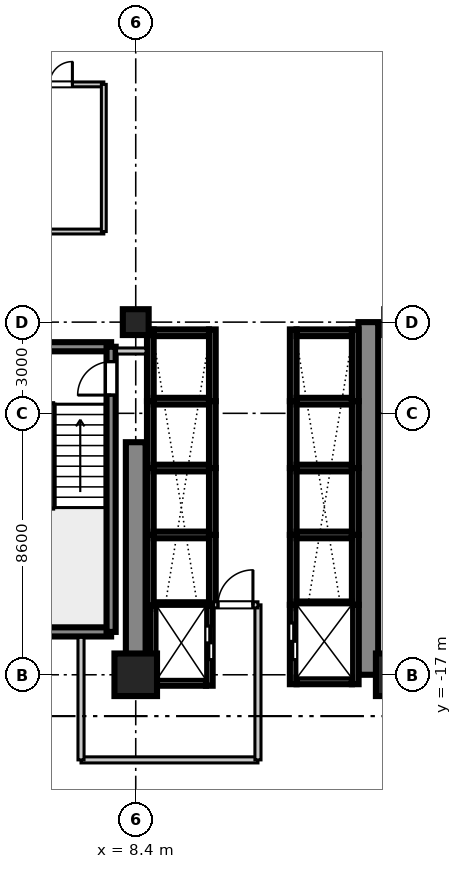
"""IFC4 building model, lengths in metres.
Left out: names, types, materials, properties, quantities, classifications, styles, units other than length and angle.
Written with IfcOpenShell. Run it as: python <this file> out.ifc"""

import sys

from ifc_helpers import new_model, si_unit, direction, frame, frame_2d, origin, origin_2d, place, context, subcontext, project, spatial, rectangle, extrude, source, transform, mapped, element, fill, save


model = new_model("IFC4")
c1 = context("Model", 3, precision=1e-05, world=origin(), true_north=direction((0.0, 1.0)))
c2 = subcontext(c1, "Body", "Model", "MODEL_VIEW")
j1 = project(units=[si_unit("LENGTHUNIT", "METRE"), si_unit("PLANEANGLEUNIT", "RADIAN")], contexts=[c1])
p1 = place(None, origin())
s1 = spatial("IfcSite", under=j1, at=p1, CompositionType="ELEMENT")
p2 = place(p1, origin())
s2 = spatial("IfcBuilding", under=s1, at=p2, CompositionType="ELEMENT")
p3 = place(p2, frame((0.0, 0.0, 76.2)))
s3 = spatial("IfcBuildingStorey", under=s2, at=p3, CompositionType="ELEMENT", Elevation=76.2)
m1 = source(origin(), c2, "Body", "SweptSolid", [
    extrude(rectangle(XDim=1.4, YDim=1.4, at=origin_2d()), origin(), (0.0, 0.0, 1.0), 3.605),
])
p4 = place(p3, frame((8.4, -17.0, 0.0), z_axis=(0.0, 0.0, 1.0), x_axis=(1.0, 0.0, 0.0)))
e1 = element("IfcColumn", 1, at=p4, inside=s3, PredefinedType="COLUMN", context=c2, shape_type="MappedRepresentation", body=[
    mapped(m1, transform((0.0, 0.0, 0.0), scale=1.0)),
])
m2 = source(origin(), c2, "Body", "SweptSolid", [
    extrude(rectangle(XDim=0.85, YDim=0.85, at=origin_2d()), origin(), (0.0, 0.0, 1.0), 3.605),
])
p5 = place(p3, frame((8.4, -5.4, 0.0), z_axis=(0.0, 0.0, 1.0), x_axis=(1.0, 0.0, 0.0)))
e2 = element("IfcColumn", 2, at=p5, inside=s3, PredefinedType="PILASTER", context=c2, shape_type="MappedRepresentation", body=[
    mapped(m2, transform((0.0, 0.0, 0.0), scale=1.0)),
])
p6 = place(p3, frame((17.0, -17.0, 0.0), z_axis=(0.0, 0.0, 1.0), x_axis=(1.0, 0.0, 0.0)))
e3 = element("IfcColumn", 3, at=p6, inside=s3, PredefinedType="COLUMN", context=c2, shape_type="MappedRepresentation", body=[
    mapped(m1, transform((0.0, 0.0, 0.0), scale=1.0)),
])
m3 = source(origin(), c2, "Body", "SweptSolid", [
    extrude(rectangle(XDim=7.65, YDim=0.65, at=frame_2d((3.825, 0.0))), origin(), (0.0, 0.0, 1.0), 3.37),
])
p7 = place(p3, frame((8.4, -17.0, 0.0), z_axis=(0.0, 0.0, 1.0), x_axis=(0.0, 1.0, 0.0)))
e4 = element("IfcWall", 4, at=p7, inside=s3, PredefinedType="SHEAR", context=c2, shape_type="MappedRepresentation", body=[
    mapped(m3, transform((0.0, 0.0, 0.0), scale=1.0)),
])
m4 = source(origin(), c2, "Body", "SweptSolid", [
    extrude(rectangle(XDim=11.6, YDim=0.65, at=frame_2d((5.8, 0.0))), origin(), (0.0, 0.0, 1.0), 3.37),
])
p8 = place(p3, frame((16.05, -17.0, 0.0), z_axis=(0.0, 0.0, 1.0), x_axis=(0.0, 1.0, 0.0)))
e5 = element("IfcWall", 5, at=p8, inside=s3, PredefinedType="SHEAR", context=c2, shape_type="MappedRepresentation", body=[
    mapped(m4, transform((0.0, 0.0, 0.0), scale=1.0)),
])
m5 = source(origin(), c2, "Body", "SweptSolid", [
    extrude(rectangle(XDim=3.98, YDim=0.3, at=frame_2d((1.99, 0.0))), origin(), (0.0, 0.0, 1.0), 3.37),
])
for number, where, z_axis, x_axis in (
    (6, (3.61, -15.59, 0.0), (0.0, 0.0, 1.0), (1.0, 0.0, 0.0)),
    (7, (3.61, -6.21, 0.0), (0.0, 0.0, 1.0), (1.0, 0.0, 0.0)),
):
    element("IfcWall", number, at=place(p3, frame(where, z_axis=z_axis, x_axis=x_axis)), inside=s3, PredefinedType="SHEAR", context=c2, shape_type="MappedRepresentation", body=[
        mapped(m5, transform((0.0, 0.0, 0.0), scale=1.0)),
    ])
m6 = source(origin(), c2, "Body", "SweptSolid", [
    extrude(rectangle(XDim=9.38, YDim=0.3, at=frame_2d((4.69, 0.0))), origin(), (0.0, 0.0, 1.0), 3.37),
])
p9 = place(p3, frame((7.59, -15.59, 0.0), z_axis=(0.0, 0.0, 1.0), x_axis=(0.0, 1.0, 0.0)))
e8 = element("IfcWall", 8, at=p9, inside=s3, PredefinedType="SHEAR", context=c2, shape_type="MappedRepresentation", body=[
    mapped(m6, transform((0.0, 0.0, 0.0), scale=1.0)),
])
p10 = place(p9, frame((7.79, 0.0, 0.0)))
e9 = element("IfcOpeningElement", 9, at=p10, cuts=e8, PredefinedType="OPENING", context=c2, shape_type="SweptSolid", body=[
    extrude(rectangle(XDim=1.1, YDim=2.15, at=frame_2d((0.55, 1.075))), frame((0.0, 0.16, 0.0), z_axis=(0.0, -1.0, 0.0), x_axis=(1.0, 0.0, 0.0)), (0.0, 0.0, 1.0), 0.32),
])
m7 = source(origin(), c2, "Body", "SweptSolid", [
    extrude(rectangle(XDim=2.36, YDim=0.22, at=frame_2d((1.18, 0.0))), origin(), (0.0, 0.0, 1.0), 3.37),
])
for number, where, z_axis, x_axis in (
    (10, (13.58, -8.0, 0.0), (0.0, 0.0, 1.0), (0.0, 1.0, 0.0)),
    (11, (15.62, -8.0, 0.0), (0.0, 0.0, 1.0), (0.0, 1.0, 0.0)),
):
    element("IfcWall", number, at=place(p3, frame(where, z_axis=z_axis, x_axis=x_axis)), inside=s3, PredefinedType="SHEAR", context=c2, shape_type="MappedRepresentation", body=[
        mapped(m7, transform((0.0, 0.0, 0.0), scale=1.0)),
    ])
m8 = source(origin(), c2, "Body", "SweptSolid", [
    extrude(rectangle(XDim=1.82, YDim=0.22, at=frame_2d((0.91, 0.0))), origin(), (0.0, 0.0, 1.0), 3.37),
])
p11 = place(p3, frame((13.69, -5.75, 0.0), z_axis=(0.0, 0.0, 1.0), x_axis=(1.0, 0.0, 0.0)))
e12 = element("IfcWall", 12, at=p11, inside=s3, PredefinedType="SHEAR", context=c2, shape_type="MappedRepresentation", body=[
    mapped(m8, transform((0.0, 0.0, 0.0), scale=1.0)),
])
m9 = source(origin(), c2, "Body", "SweptSolid", [
    extrude(rectangle(XDim=2.2, YDim=0.22, at=frame_2d((1.1, 0.0))), origin(), (0.0, 0.0, 1.0), 3.37),
])
for number, where, z_axis, x_axis in (
    (13, (13.58, -10.2, 0.0), (0.0, 0.0, 1.0), (0.0, 1.0, 0.0)),
    (14, (15.62, -10.2, 0.0), (0.0, 0.0, 1.0), (0.0, 1.0, 0.0)),
):
    element("IfcWall", number, at=place(p3, frame(where, z_axis=z_axis, x_axis=x_axis)), inside=s3, PredefinedType="SHEAR", context=c2, shape_type="MappedRepresentation", body=[
        mapped(m9, transform((0.0, 0.0, 0.0), scale=1.0)),
    ])
m10 = source(origin(), c2, "Body", "SweptSolid", [
    extrude(rectangle(XDim=1.82, YDim=0.22, at=frame_2d((0.91, 0.0))), origin(), (0.0, 0.0, 1.0), 3.65),
])
p12 = place(p3, frame((13.69, -8.0, 0.0), z_axis=(0.0, 0.0, 1.0), x_axis=(1.0, 0.0, 0.0)))
e15 = element("IfcWall", 15, at=p12, inside=s3, PredefinedType="SHEAR", context=c2, shape_type="MappedRepresentation", body=[
    mapped(m10, transform((0.0, 0.0, 0.0), scale=1.0)),
])
for number, where, z_axis, x_axis in (
    (16, (13.58, -12.4, 0.0), (0.0, 0.0, 1.0), (0.0, 1.0, 0.0)),
    (17, (15.62, -12.4, 0.0), (0.0, 0.0, 1.0), (0.0, 1.0, 0.0)),
):
    element("IfcWall", number, at=place(p3, frame(where, z_axis=z_axis, x_axis=x_axis)), inside=s3, PredefinedType="SHEAR", context=c2, shape_type="MappedRepresentation", body=[
        mapped(m9, transform((0.0, 0.0, 0.0), scale=1.0)),
    ])
p13 = place(p3, frame((13.69, -10.2, 0.0), z_axis=(0.0, 0.0, 1.0), x_axis=(1.0, 0.0, 0.0)))
e18 = element("IfcWall", 18, at=p13, inside=s3, PredefinedType="SHEAR", context=c2, shape_type="MappedRepresentation", body=[
    mapped(m10, transform((0.0, 0.0, 0.0), scale=1.0)),
])
m11 = source(origin(), c2, "Body", "SweptSolid", [
    extrude(rectangle(XDim=2.3, YDim=0.22, at=frame_2d((1.15, 0.0))), origin(), (0.0, 0.0, 1.0), 3.37),
])
for number, where, z_axis, x_axis in (
    (19, (13.58, -14.7, 0.0), (0.0, 0.0, 1.0), (0.0, 1.0, 0.0)),
    (20, (15.62, -14.7, 0.0), (0.0, 0.0, 1.0), (0.0, 1.0, 0.0)),
):
    element("IfcWall", number, at=place(p3, frame(where, z_axis=z_axis, x_axis=x_axis)), inside=s3, PredefinedType="SHEAR", context=c2, shape_type="MappedRepresentation", body=[
        mapped(m11, transform((0.0, 0.0, 0.0), scale=1.0)),
    ])
p14 = place(p3, frame((13.69, -12.4, 0.0), z_axis=(0.0, 0.0, 1.0), x_axis=(1.0, 0.0, 0.0)))
e21 = element("IfcWall", 21, at=p14, inside=s3, PredefinedType="SHEAR", context=c2, shape_type="MappedRepresentation", body=[
    mapped(m10, transform((0.0, 0.0, 0.0), scale=1.0)),
])
for number, where, z_axis, x_axis in (
    (22, (8.88, -8.0, 0.0), (0.0, 0.0, 1.0), (0.0, 1.0, 0.0)),
    (23, (10.92, -8.0, 0.0), (0.0, 0.0, 1.0), (0.0, 1.0, 0.0)),
):
    element("IfcWall", number, at=place(p3, frame(where, z_axis=z_axis, x_axis=x_axis)), inside=s3, PredefinedType="SHEAR", context=c2, shape_type="MappedRepresentation", body=[
        mapped(m7, transform((0.0, 0.0, 0.0), scale=1.0)),
    ])
p15 = place(p3, frame((8.99, -5.75, 0.0), z_axis=(0.0, 0.0, 1.0), x_axis=(1.0, 0.0, 0.0)))
e24 = element("IfcWall", 24, at=p15, inside=s3, PredefinedType="SHEAR", context=c2, shape_type="MappedRepresentation", body=[
    mapped(m8, transform((0.0, 0.0, 0.0), scale=1.0)),
])
for number, where, z_axis, x_axis in (
    (25, (8.88, -10.2, 0.0), (0.0, 0.0, 1.0), (0.0, 1.0, 0.0)),
    (26, (10.92, -10.2, 0.0), (0.0, 0.0, 1.0), (0.0, 1.0, 0.0)),
):
    element("IfcWall", number, at=place(p3, frame(where, z_axis=z_axis, x_axis=x_axis)), inside=s3, PredefinedType="SHEAR", context=c2, shape_type="MappedRepresentation", body=[
        mapped(m9, transform((0.0, 0.0, 0.0), scale=1.0)),
    ])
p16 = place(p3, frame((8.99, -8.0, 0.0), z_axis=(0.0, 0.0, 1.0), x_axis=(1.0, 0.0, 0.0)))
e27 = element("IfcWall", 27, at=p16, inside=s3, PredefinedType="SHEAR", context=c2, shape_type="MappedRepresentation", body=[
    mapped(m10, transform((0.0, 0.0, 0.0), scale=1.0)),
])
for number, where, z_axis, x_axis in (
    (28, (8.88, -12.4, 0.0), (0.0, 0.0, 1.0), (0.0, 1.0, 0.0)),
    (29, (10.92, -12.4, 0.0), (0.0, 0.0, 1.0), (0.0, 1.0, 0.0)),
):
    element("IfcWall", number, at=place(p3, frame(where, z_axis=z_axis, x_axis=x_axis)), inside=s3, PredefinedType="SHEAR", context=c2, shape_type="MappedRepresentation", body=[
        mapped(m9, transform((0.0, 0.0, 0.0), scale=1.0)),
    ])
p17 = place(p3, frame((8.99, -10.2, 0.0), z_axis=(0.0, 0.0, 1.0), x_axis=(1.0, 0.0, 0.0)))
e30 = element("IfcWall", 30, at=p17, inside=s3, PredefinedType="SHEAR", context=c2, shape_type="MappedRepresentation", body=[
    mapped(m10, transform((0.0, 0.0, 0.0), scale=1.0)),
])
m12 = source(origin(), c2, "Body", "SweptSolid", [
    extrude(rectangle(XDim=2.325, YDim=0.22, at=frame_2d((1.163, 0.0))), origin(), (0.0, 0.0, 1.0), 3.37),
])
for number, where, z_axis, x_axis in (
    (31, (8.88, -14.725, 0.0), (0.0, 0.0, 1.0), (0.0, 1.0, 0.0)),
    (32, (10.92, -14.725, 0.0), (0.0, 0.0, 1.0), (0.0, 1.0, 0.0)),
):
    element("IfcWall", number, at=place(p3, frame(where, z_axis=z_axis, x_axis=x_axis)), inside=s3, PredefinedType="SHEAR", context=c2, shape_type="MappedRepresentation", body=[
        mapped(m12, transform((0.0, 0.0, 0.0), scale=1.0)),
    ])
p18 = place(p3, frame((8.99, -12.4, 0.0), z_axis=(0.0, 0.0, 1.0), x_axis=(1.0, 0.0, 0.0)))
e33 = element("IfcWall", 33, at=p18, inside=s3, PredefinedType="SHEAR", context=c2, shape_type="MappedRepresentation", body=[
    mapped(m10, transform((0.0, 0.0, 0.0), scale=1.0)),
])
m13 = source(origin(), c2, "Body", "SweptSolid", [
    extrude(rectangle(XDim=2.635, YDim=0.22, at=frame_2d((1.317, 0.0))), origin(), (0.0, 0.0, 1.0), 3.37),
])
p19 = place(p3, frame((8.98, -17.36, 0.0), z_axis=(0.0, 0.0, 1.0), x_axis=(0.0, 1.0, 0.0)))
e34 = element("IfcWall", 34, at=p19, inside=s3, PredefinedType="SHEAR", context=c2, shape_type="MappedRepresentation", body=[
    mapped(m13, transform((0.0, 0.0, 0.0), scale=1.0)),
])
p20 = place(p3, frame((10.82, -17.36, 0.0), z_axis=(0.0, 0.0, 1.0), x_axis=(0.0, 1.0, 0.0)))
e35 = element("IfcWall", 35, at=p20, inside=s3, PredefinedType="SHEAR", context=c2, shape_type="MappedRepresentation", body=[
    mapped(m13, transform((0.0, 0.0, 0.0), scale=1.0)),
])
p21 = place(p20, frame((0.86, 0.0, 0.0)))
e36 = element("IfcOpeningElement", 36, at=p21, cuts=e35, PredefinedType="OPENING", context=c2, shape_type="SweptSolid", body=[
    extrude(rectangle(XDim=1.1, YDim=2.2, at=frame_2d((0.55, 1.1))), frame((0.0, 0.12, 0.0), z_axis=(0.0, -1.0, 0.0), x_axis=(1.0, 0.0, 0.0)), (0.0, 0.0, 1.0), 0.24),
])
m14 = source(origin(), c2, "Body", "SweptSolid", [
    extrude(rectangle(XDim=1.62, YDim=0.22, at=frame_2d((0.81, 0.0))), origin(), (0.0, 0.0, 1.0), 3.37),
])
p22 = place(p3, frame((9.09, -17.25, 0.0), z_axis=(0.0, 0.0, 1.0), x_axis=(1.0, 0.0, 0.0)))
e37 = element("IfcWall", 37, at=p22, inside=s3, PredefinedType="SHEAR", context=c2, shape_type="MappedRepresentation", body=[
    mapped(m14, transform((0.0, 0.0, 0.0), scale=1.0)),
])
m15 = source(origin(), c2, "Body", "SweptSolid", [
    extrude(rectangle(XDim=1.62, YDim=0.22, at=frame_2d((0.81, 0.0))), origin(), (0.0, 0.0, 1.0), 3.65),
])
p23 = place(p3, frame((9.09, -14.725, 0.0), z_axis=(0.0, 0.0, 1.0), x_axis=(1.0, 0.0, 0.0)))
e38 = element("IfcWall", 38, at=p23, inside=s3, PredefinedType="SHEAR", context=c2, shape_type="MappedRepresentation", body=[
    mapped(m15, transform((0.0, 0.0, 0.0), scale=1.0)),
])
m16 = source(origin(), c2, "Body", "SweptSolid", [
    extrude(rectangle(XDim=2.61, YDim=0.22, at=frame_2d((1.305, 0.0))), origin(), (0.0, 0.0, 1.0), 3.37),
])
p24 = place(p3, frame((13.58, -17.31, 0.0), z_axis=(0.0, 0.0, 1.0), x_axis=(0.0, 1.0, 0.0)))
e39 = element("IfcWall", 39, at=p24, inside=s3, PredefinedType="SHEAR", context=c2, shape_type="MappedRepresentation", body=[
    mapped(m16, transform((0.0, 0.0, 0.0), scale=1.0)),
])
p25 = place(p24, frame((0.81, 0.0, 0.0)))
e40 = element("IfcOpeningElement", 40, at=p25, cuts=e39, PredefinedType="OPENING", context=c2, shape_type="SweptSolid", body=[
    extrude(rectangle(XDim=1.2, YDim=2.2, at=frame_2d((0.6, 1.1))), frame((0.0, 0.12, 0.0), z_axis=(0.0, -1.0, 0.0), x_axis=(1.0, 0.0, 0.0)), (0.0, 0.0, 1.0), 0.24),
])
p26 = place(p3, frame((15.62, -17.31, 0.0), z_axis=(0.0, 0.0, 1.0), x_axis=(0.0, 1.0, 0.0)))
e41 = element("IfcWall", 41, at=p26, inside=s3, PredefinedType="SHEAR", context=c2, shape_type="MappedRepresentation", body=[
    mapped(m16, transform((0.0, 0.0, 0.0), scale=1.0)),
])
p27 = place(p3, frame((13.69, -17.2, 0.0), z_axis=(0.0, 0.0, 1.0), x_axis=(1.0, 0.0, 0.0)))
e42 = element("IfcWall", 42, at=p27, inside=s3, PredefinedType="SHEAR", context=c2, shape_type="MappedRepresentation", body=[
    mapped(m8, transform((0.0, 0.0, 0.0), scale=1.0)),
])
p28 = place(p3, frame((13.69, -14.7, 0.0), z_axis=(0.0, 0.0, 1.0), x_axis=(1.0, 0.0, 0.0)))
e43 = element("IfcWall", 43, at=p28, inside=s3, PredefinedType="SHEAR", context=c2, shape_type="MappedRepresentation", body=[
    mapped(m10, transform((0.0, 0.0, 0.0), scale=1.0)),
])
m17 = source(origin(), c2, "Body", "SweptSolid", [
    extrude(rectangle(XDim=5.82, YDim=0.2, at=frame_2d((2.91, 0.0))), origin(), (0.0, 0.0, 1.0), 2.71),
])
p29 = place(p3, frame((6.6, -19.8, 0.0), z_axis=(0.0, 0.0, 1.0), x_axis=(1.0, 0.0, 0.0)))
e44 = element("IfcWall", 44, at=p29, inside=s3, PredefinedType="PARTITIONING", context=c2, shape_type="MappedRepresentation", body=[
    mapped(m17, transform((0.0, 0.0, 0.0), scale=1.0)),
])
m18 = source(origin(), c2, "Body", "SweptSolid", [
    extrude(rectangle(XDim=4.03, YDim=0.2, at=frame_2d((2.015, 0.0))), origin(), (0.0, 0.0, 1.0), 2.71),
])
p30 = place(p3, frame((6.6, -19.8, 0.0), z_axis=(0.0, 0.0, 1.0), x_axis=(0.0, 1.0, 0.0)))
e45 = element("IfcWall", 45, at=p30, inside=s3, PredefinedType="PARTITIONING", context=c2, shape_type="MappedRepresentation", body=[
    mapped(m18, transform((0.0, 0.0, 0.0), scale=1.0)),
])
m19 = source(origin(), c2, "Body", "SweptSolid", [
    extrude(rectangle(XDim=5.1, YDim=0.2, at=frame_2d((2.55, 0.0))), origin(), (0.0, 0.0, 1.0), 2.71),
])
p31 = place(p3, frame((12.42, -19.8, 0.0), z_axis=(0.0, 0.0, 1.0), x_axis=(0.0, 1.0, 0.0)))
e46 = element("IfcWall", 46, at=p31, inside=s3, PredefinedType="PARTITIONING", context=c2, shape_type="MappedRepresentation", body=[
    mapped(m19, transform((0.0, 0.0, 0.0), scale=1.0)),
])
m20 = source(origin(), c2, "Body", "SweptSolid", [
    extrude(rectangle(XDim=1.46, YDim=0.2, at=frame_2d((0.73, 0.0))), origin(), (0.0, 0.0, 1.0), 2.71),
])
p32 = place(p3, frame((10.96, -14.7, 0.0), z_axis=(0.0, 0.0, 1.0), x_axis=(1.0, 0.0, 0.0)))
e47 = element("IfcWall", 47, at=p32, inside=s3, PredefinedType="PARTITIONING", context=c2, shape_type="MappedRepresentation", body=[
    mapped(m20, transform((0.0, 0.0, 0.0), scale=1.0)),
])
p33 = place(p32, frame((0.145, 0.0, 0.0)))
e48 = element("IfcOpeningElement", 48, at=p33, cuts=e47, PredefinedType="OPENING", context=c2, shape_type="SweptSolid", body=[
    extrude(rectangle(XDim=1.15, YDim=2.15, at=frame_2d((0.575, 1.075))), frame((0.0, 0.11, 0.0), z_axis=(0.0, -1.0, 0.0), x_axis=(1.0, 0.0, 0.0)), (0.0, 0.0, 1.0), 0.22),
])
m21 = source(origin(), c2, "Body", "SweptSolid", [
    extrude(rectangle(XDim=0.97, YDim=0.2, at=frame_2d((0.485, 0.0))), origin(), (0.0, 0.0, 1.0), 2.71),
])
p34 = place(p3, frame((7.77, -6.35, 0.0), z_axis=(0.0, 0.0, 1.0), x_axis=(1.0, 0.0, 0.0)))
e49 = element("IfcWall", 49, at=p34, inside=s3, PredefinedType="PARTITIONING", context=c2, shape_type="MappedRepresentation", body=[
    mapped(m21, transform((0.0, 0.0, 0.0), scale=1.0)),
])
m22 = source(origin(), c2, "Body", "SweptSolid", [
    extrude(rectangle(XDim=15.6, YDim=0.16, at=frame_2d((7.8, 0.0))), origin(), (0.0, 0.0, 1.0), 2.71),
])
p35 = place(p3, frame((-8.25, -2.42, 0.0), z_axis=(0.0, 0.0, 1.0), x_axis=(1.0, 0.0, 0.0)))
e50 = element("IfcWall", 50, at=p35, inside=s3, PredefinedType="PARTITIONING", context=c2, shape_type="MappedRepresentation", body=[
    mapped(m22, transform((0.0, 0.0, 0.0), scale=1.0)),
])
p36 = place(p3, frame((-8.25, 2.42, 0.0), z_axis=(0.0, 0.0, 1.0), x_axis=(1.0, 0.0, 0.0)))
e51 = element("IfcWall", 51, at=p36, inside=s3, PredefinedType="PARTITIONING", context=c2, shape_type="MappedRepresentation", body=[
    mapped(m22, transform((0.0, 0.0, 0.0), scale=1.0)),
])
p37 = place(p36, frame((13.067, 0.0, 0.0)))
e52 = element("IfcOpeningElement", 52, at=p37, cuts=e51, PredefinedType="OPENING", context=c2, shape_type="SweptSolid", body=[
    extrude(rectangle(XDim=1.5, YDim=2.15, at=frame_2d((0.75, 1.075))), frame((0.0, 0.09, 0.0), z_axis=(0.0, -1.0, 0.0), x_axis=(1.0, 0.0, 0.0)), (0.0, 0.0, 1.0), 0.18),
])
m23 = source(origin(), c2, "Body", "SweptSolid", [
    extrude(rectangle(XDim=4.84, YDim=0.16, at=frame_2d((2.42, 0.0))), origin(), (0.0, 0.0, 1.0), 2.71),
])
p38 = place(p3, frame((7.35, -2.42, 0.0), z_axis=(0.0, 0.0, 1.0), x_axis=(0.0, 1.0, 0.0)))
e53 = element("IfcWall", 53, at=p38, inside=s3, PredefinedType="PARTITIONING", context=c2, shape_type="MappedRepresentation", body=[
    mapped(m23, transform((0.0, 0.0, 0.0), scale=1.0)),
])
m24 = source(origin(), c2, "Body", "SweptSolid", [
    extrude(rectangle(XDim=1.1, YDim=2.15, at=frame_2d((0.55, 1.075))), frame((0.0, 0.025, 0.0), z_axis=(0.0, -1.0, 0.0), x_axis=(1.0, 0.0, 0.0)), (0.0, 0.0, 1.0), 0.05),
])
p39 = place(p10, origin())
e54 = element("IfcDoor", 54, at=p39, inside=s3, OperationType="SINGLE_SWING_LEFT", PredefinedType="DOOR", context=c2, shape_type="MappedRepresentation", body=[
    mapped(m24, transform((0.0, 0.0, 0.0), scale=1.0)),
])
fill(e9, e54)
m25 = source(origin(), c2, "Body", "SweptSolid", [
    extrude(rectangle(XDim=1.1, YDim=2.2, at=frame_2d((0.55, 1.1))), frame((0.0, 0.025, 0.0), z_axis=(0.0, -1.0, 0.0), x_axis=(1.0, 0.0, 0.0)), (0.0, 0.0, 1.0), 0.05),
])
p40 = place(p21, frame((1.1, 0.0, 0.0), z_axis=(0.0, 0.0, 1.0), x_axis=(-1.0, 0.0, 0.0)))
e55 = element("IfcDoor", 55, at=p40, inside=s3, OperationType="DOUBLE_DOOR_SLIDING", PredefinedType="DOOR", context=c2, shape_type="MappedRepresentation", body=[
    mapped(m25, transform((0.0, 0.0, 0.0), scale=1.0)),
])
fill(e36, e55)
m26 = source(origin(), c2, "Body", "SweptSolid", [
    extrude(rectangle(XDim=1.2, YDim=2.2, at=frame_2d((0.6, 1.1))), frame((0.0, 0.025, 0.0), z_axis=(0.0, -1.0, 0.0), x_axis=(1.0, 0.0, 0.0)), (0.0, 0.0, 1.0), 0.05),
])
p41 = place(p25, origin())
e56 = element("IfcDoor", 56, at=p41, inside=s3, OperationType="DOUBLE_DOOR_SLIDING", PredefinedType="DOOR", context=c2, shape_type="MappedRepresentation", body=[
    mapped(m26, transform((0.0, 0.0, 0.0), scale=1.0)),
])
fill(e40, e56)
m27 = source(origin(), c2, "Body", "SweptSolid", [
    extrude(rectangle(XDim=1.15, YDim=2.15, at=frame_2d((0.575, 1.075))), frame((0.0, 0.025, 0.0), z_axis=(0.0, -1.0, 0.0), x_axis=(1.0, 0.0, 0.0)), (0.0, 0.0, 1.0), 0.05),
])
p42 = place(p33, origin())
e57 = element("IfcDoor", 57, at=p42, inside=s3, OperationType="SINGLE_SWING_RIGHT", PredefinedType="DOOR", context=c2, shape_type="MappedRepresentation", body=[
    mapped(m27, transform((0.0, 0.0, 0.0), scale=1.0)),
])
fill(e48, e57)
m28 = source(origin(), c2, "Body", "SweptSolid", [
    extrude(rectangle(XDim=1.5, YDim=2.15, at=frame_2d((0.75, 1.075))), frame((0.0, 0.025, 0.0), z_axis=(0.0, -1.0, 0.0), x_axis=(1.0, 0.0, 0.0)), (0.0, 0.0, 1.0), 0.05),
])
p43 = place(p37, frame((1.5, 0.0, 0.0), z_axis=(0.0, 0.0, 1.0), x_axis=(-1.0, 0.0, 0.0)))
e58 = element("IfcDoor", 58, at=p43, inside=s3, OperationType="DOUBLE_DOOR_SINGLE_SWING", PredefinedType="DOOR", context=c2, shape_type="MappedRepresentation", body=[
    mapped(m28, transform((0.0, 0.0, 0.0), scale=1.0)),
])
fill(e52, e58)
save(model, sys.argv[1])
